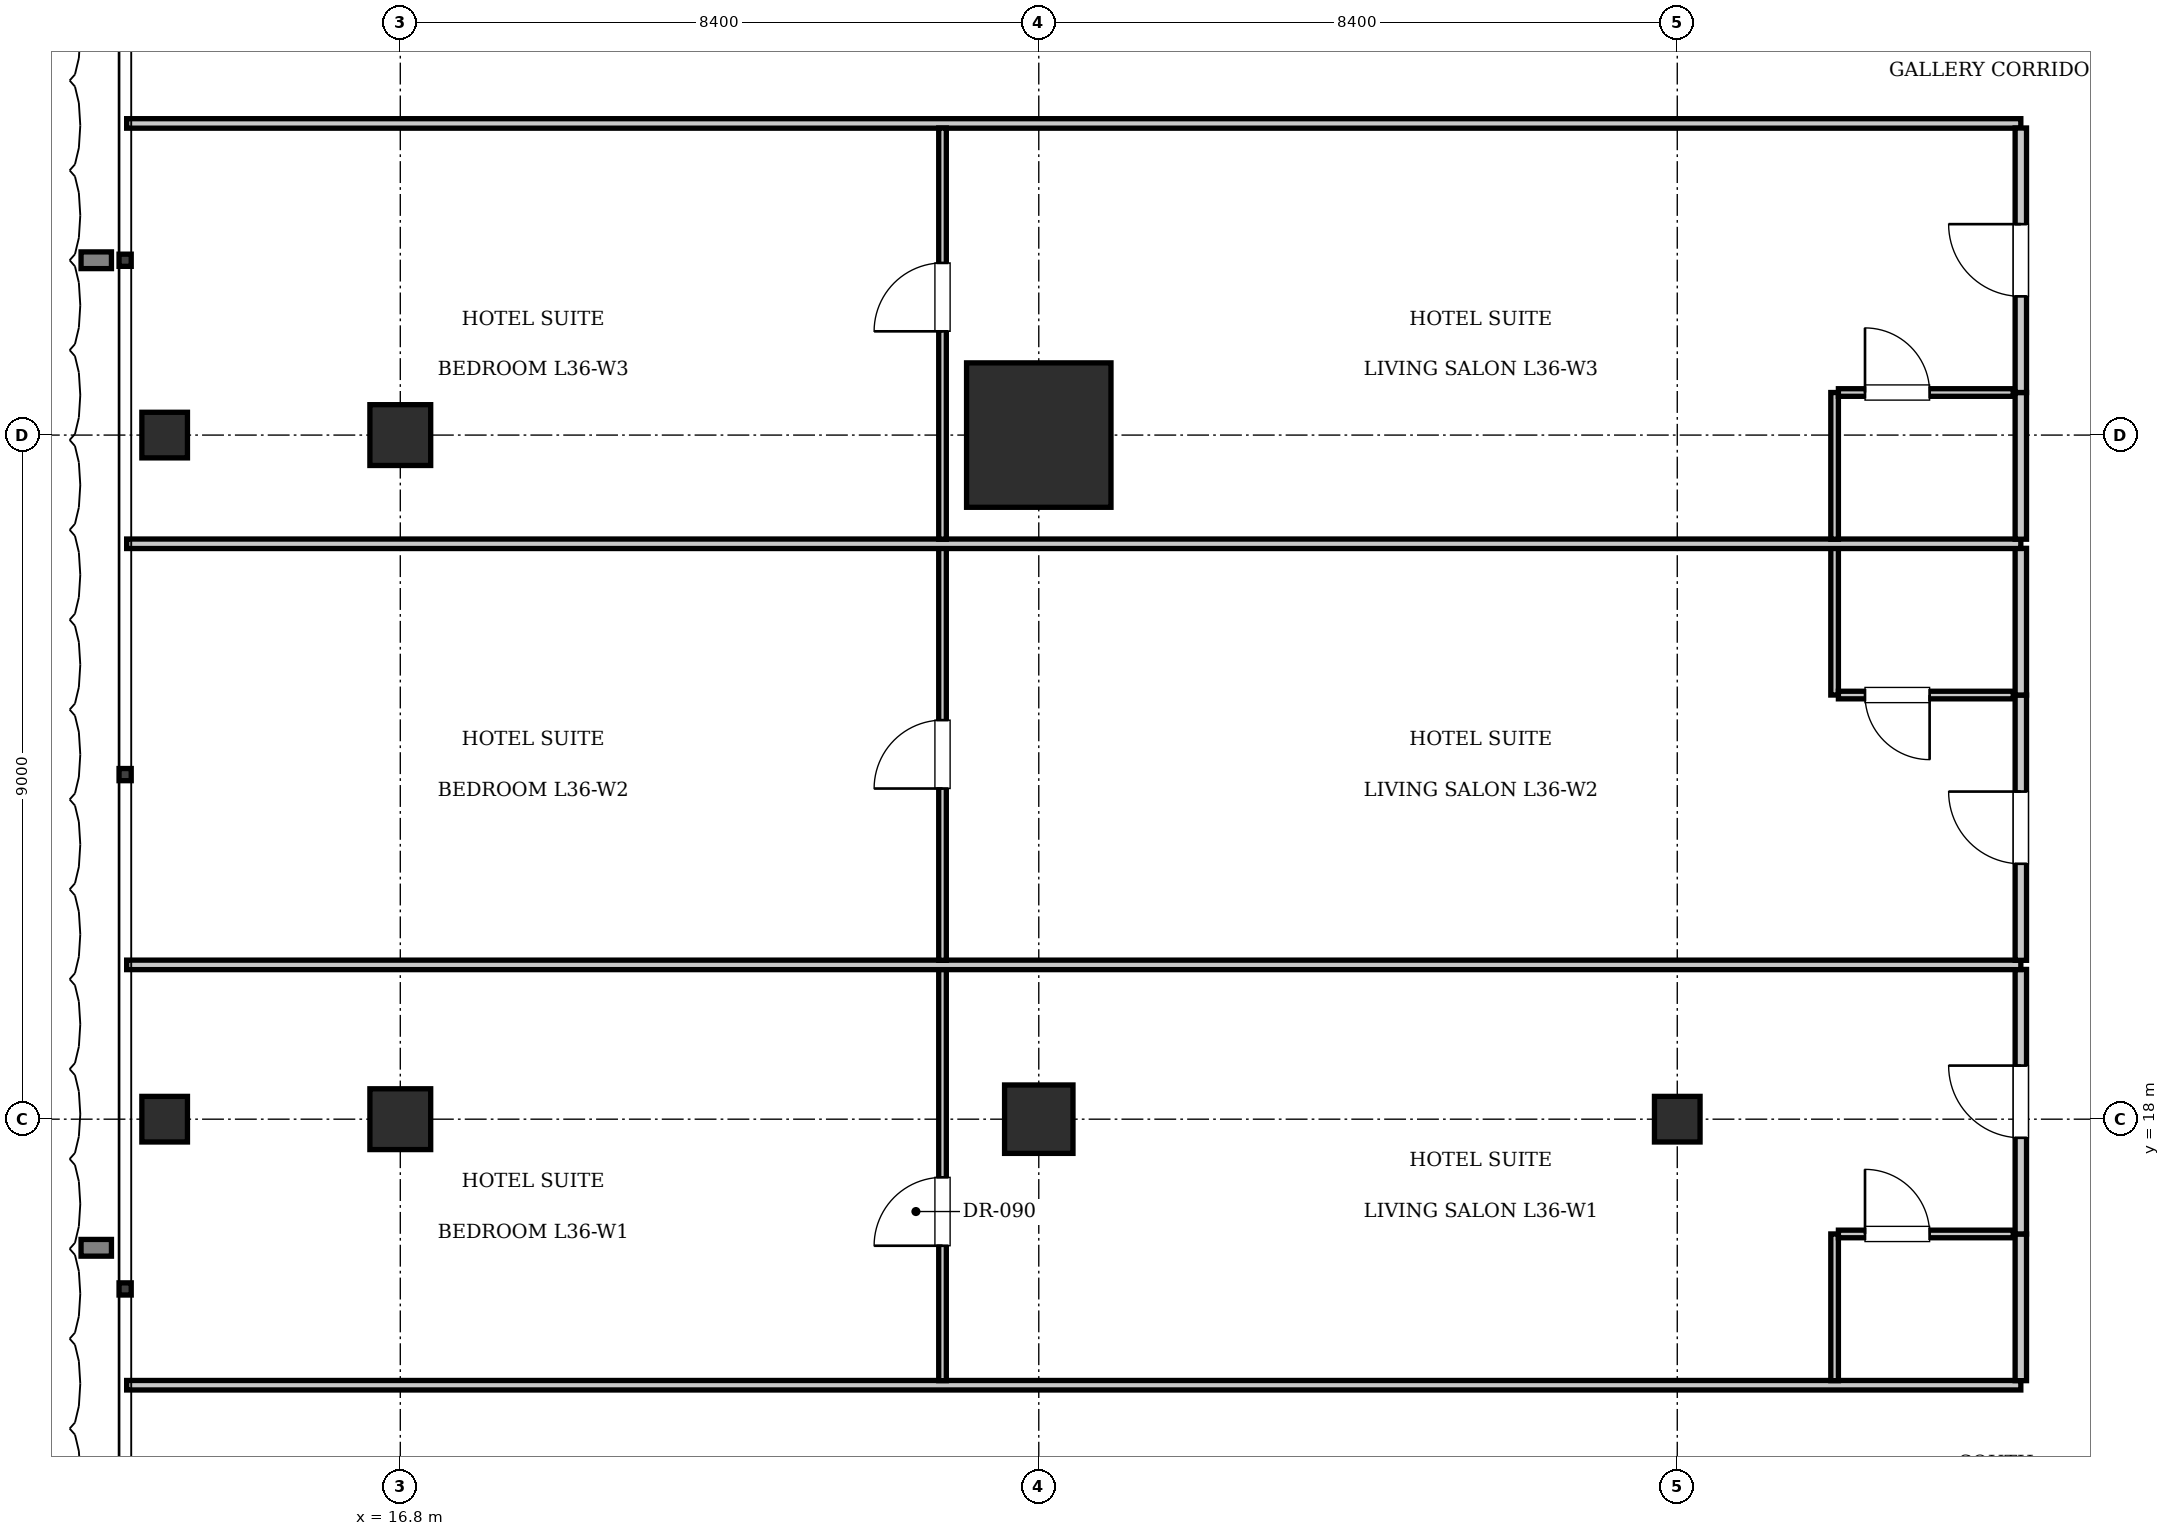
"""IFC4 building model, lengths in metres.
Left out: names, types, materials, properties, quantities, classifications, styles, units other than length and angle.
Written with IfcOpenShell. Run it as: python <this file> out.ifc"""

import sys

from ifc_helpers import new_model, si_unit, direction, frame, frame_2d, origin, origin_2d, place, context, subcontext, project, spatial, rectangle, i_section, extrude, element, fill, save


model = new_model("IFC4")
c1 = context("Model", 3, precision=1e-05, world=origin(), true_north=direction((0.0, 1.0)))
c2 = subcontext(c1, "Body", "Model", "MODEL_VIEW")
j1 = project(units=[si_unit("LENGTHUNIT", "METRE"), si_unit("PLANEANGLEUNIT", "RADIAN")], contexts=[c1])
p1 = place(None, origin())
s1 = spatial("IfcSite", under=j1, at=p1, CompositionType="ELEMENT")
p2 = place(p1, origin())
s2 = spatial("IfcBuilding", under=s1, at=p2, CompositionType="ELEMENT")
p3 = place(p2, frame((0.0, 0.0, 150.5)))
s3 = spatial("IfcBuildingStorey", under=s2, at=p3, CompositionType="ELEMENT", Elevation=150.5)
p4 = place(p3, frame((25.2, 27.0, 0.0), z_axis=(0.0, 0.0, 1.0), x_axis=(1.0, 0.0, 0.0)))
e1 = element("IfcColumn", 1, at=p4, inside=s3, PredefinedType="COLUMN", context=c2, shape_type="SweptSolid", body=[
    extrude(rectangle(XDim=1.9, YDim=1.9, at=origin_2d()), origin(), (0.0, 0.0, 1.0), 3.85),
])
p5 = place(p3, frame((25.2, 18.0, 0.0), z_axis=(0.0, 0.0, 1.0), x_axis=(1.0, 0.0, 0.0)))
e2 = element("IfcColumn", 2, at=p5, inside=s3, PredefinedType="COLUMN", context=c2, shape_type="SweptSolid", body=[
    extrude(rectangle(XDim=0.9, YDim=0.9, at=origin_2d()), origin(), (0.0, 0.0, 1.0), 3.85),
])
p6 = place(p3, frame((33.6, 18.0, 0.0), z_axis=(0.0, 0.0, 1.0), x_axis=(1.0, 0.0, 0.0)))
e3 = element("IfcColumn", 3, at=p6, inside=s3, PredefinedType="COLUMN", context=c2, shape_type="SweptSolid", body=[
    extrude(i_section(OverallWidth=0.6, OverallDepth=0.6, WebThickness=0.025, FlangeThickness=0.038, at=origin_2d()), origin(), (0.0, 0.0, 1.0), 3.85),
])
for number, where, z_axis, x_axis in (
    (4, (16.8, 18.0, 0.0), (0.0, 0.0, 1.0), (1.0, 0.0, 0.0)),
    (5, (16.8, 27.0, 0.0), (0.0, 0.0, 1.0), (1.0, 0.0, 0.0)),
):
    element("IfcColumn", number, at=place(p3, frame(where, z_axis=z_axis, x_axis=x_axis)), inside=s3, PredefinedType="COLUMN", context=c2, shape_type="SweptSolid", body=[
        extrude(rectangle(XDim=0.8, YDim=0.8, at=origin_2d()), origin(), (0.0, 0.0, 1.0), 3.85),
    ])
for number, where, z_axis, x_axis in (
    (6, (13.7, 18.0, 0.0), (0.0, 0.0, 1.0), (1.0, 0.0, 0.0)),
    (7, (13.7, 27.0, 0.0), (0.0, 0.0, 1.0), (1.0, 0.0, 0.0)),
):
    element("IfcColumn", number, at=place(p3, frame(where, z_axis=z_axis, x_axis=x_axis)), inside=s3, PredefinedType="COLUMN", context=c2, shape_type="SweptSolid", body=[
        extrude(i_section(OverallWidth=0.6, OverallDepth=0.6, WebThickness=0.025, FlangeThickness=0.038, at=origin_2d()), origin(), (0.0, 0.0, 1.0), 3.85),
    ])
for number, where, z_axis, x_axis in (
    (8, (13.2, 14.5, 0.0), (0.0, 0.0, 1.0), (1.0, 0.0, 0.0)),
    (9, (13.2, 31.1, 0.0), (0.0, 0.0, 1.0), (1.0, 0.0, 0.0)),
):
    element("IfcWall", number, at=place(p3, frame(where, z_axis=z_axis, x_axis=x_axis)), inside=s3, PredefinedType="PARTITIONING", context=c2, shape_type="SweptSolid", body=[
        extrude(rectangle(XDim=24.92, YDim=0.125, at=frame_2d((12.46, 0.0))), origin(), (0.0, 0.0, 1.0), 3.61),
    ])
p7 = place(p3, frame((38.12, 14.56, 0.0), z_axis=(0.0, 0.0, 1.0), x_axis=(0.0, 1.0, 0.0)))
e10 = element("IfcWall", 10, at=p7, inside=s3, PredefinedType="PARTITIONING", context=c2, shape_type="SweptSolid", body=[
    extrude(rectangle(XDim=1.93, YDim=0.15, at=frame_2d((0.965, 0.0))), origin(), (0.0, 0.0, 1.0), 3.61),
])
p8 = place(p3, frame((38.12, 16.49, 0.0), z_axis=(0.0, 0.0, 1.0), x_axis=(0.0, 1.0, 0.0)))
e11 = element("IfcWall", 11, at=p8, inside=s3, PredefinedType="PARTITIONING", context=c2, shape_type="SweptSolid", body=[
    extrude(rectangle(XDim=3.48, YDim=0.15, at=frame_2d((1.74, 0.0))), origin(), (0.0, 0.0, 1.0), 3.61),
])
p9 = place(p8, frame((1.265, 0.0, 0.0)))
e12 = element("IfcOpeningElement", 12, at=p9, cuts=e11, PredefinedType="OPENING", context=c2, shape_type="SweptSolid", body=[
    extrude(rectangle(XDim=0.95, YDim=2.15, at=frame_2d((0.475, 1.075))), frame((0.0, 0.085, 0.0), z_axis=(0.0, -1.0, 0.0), x_axis=(1.0, 0.0, 0.0)), (0.0, 0.0, 1.0), 0.17),
])
p10 = place(p3, frame((35.67, 14.56, 0.0), z_axis=(0.0, 0.0, 1.0), x_axis=(0.0, 1.0, 0.0)))
e13 = element("IfcWall", 13, at=p10, inside=s3, PredefinedType="PARTITIONING", context=c2, shape_type="SweptSolid", body=[
    extrude(rectangle(XDim=1.93, YDim=0.1, at=frame_2d((0.965, 0.0))), origin(), (0.0, 0.0, 1.0), 3.61),
])
p11 = place(p3, frame((35.72, 16.49, 0.0), z_axis=(0.0, 0.0, 1.0), x_axis=(1.0, 0.0, 0.0)))
e14 = element("IfcWall", 14, at=p11, inside=s3, PredefinedType="PARTITIONING", context=c2, shape_type="SweptSolid", body=[
    extrude(rectangle(XDim=2.3, YDim=0.1, at=frame_2d((1.15, 0.0))), origin(), (0.0, 0.0, 1.0), 3.61),
])
p12 = place(p11, frame((0.35, 0.0, 0.0)))
e15 = element("IfcOpeningElement", 15, at=p12, cuts=e14, PredefinedType="OPENING", context=c2, shape_type="SweptSolid", body=[
    extrude(rectangle(XDim=0.85, YDim=2.1, at=frame_2d((0.425, 1.05))), frame((0.0, 0.06, 0.0), z_axis=(0.0, -1.0, 0.0), x_axis=(1.0, 0.0, 0.0)), (0.0, 0.0, 1.0), 0.12),
])
p13 = place(p3, frame((23.934, 14.56, 0.0), z_axis=(0.0, 0.0, 1.0), x_axis=(0.0, 1.0, 0.0)))
e16 = element("IfcWall", 16, at=p13, inside=s3, PredefinedType="PARTITIONING", context=c2, shape_type="SweptSolid", body=[
    extrude(rectangle(XDim=5.41, YDim=0.1, at=frame_2d((2.705, 0.0))), origin(), (0.0, 0.0, 1.0), 3.61),
])
p14 = place(p13, frame((1.775, 0.0, 0.0)))
e17 = element("IfcOpeningElement", 17, at=p14, cuts=e16, PredefinedType="OPENING", context=c2, shape_type="SweptSolid", body=[
    extrude(rectangle(XDim=0.9, YDim=2.1, at=frame_2d((0.45, 1.05))), frame((0.0, 0.06, 0.0), z_axis=(0.0, -1.0, 0.0), x_axis=(1.0, 0.0, 0.0)), (0.0, 0.0, 1.0), 0.12),
])
p15 = place(p3, frame((13.2, 20.03, 0.0), z_axis=(0.0, 0.0, 1.0), x_axis=(1.0, 0.0, 0.0)))
e18 = element("IfcWall", 18, at=p15, inside=s3, PredefinedType="PARTITIONING", context=c2, shape_type="SweptSolid", body=[
    extrude(rectangle(XDim=24.92, YDim=0.125, at=frame_2d((12.46, 0.0))), origin(), (0.0, 0.0, 1.0), 3.61),
])
p16 = place(p3, frame((38.12, 20.09, 0.0), z_axis=(0.0, 0.0, 1.0), x_axis=(0.0, 1.0, 0.0)))
e19 = element("IfcWall", 19, at=p16, inside=s3, PredefinedType="PARTITIONING", context=c2, shape_type="SweptSolid", body=[
    extrude(rectangle(XDim=3.49, YDim=0.15, at=frame_2d((1.745, 0.0))), origin(), (0.0, 0.0, 1.0), 3.61),
])
p17 = place(p16, frame((1.27, 0.0, 0.0)))
e20 = element("IfcOpeningElement", 20, at=p17, cuts=e19, PredefinedType="OPENING", context=c2, shape_type="SweptSolid", body=[
    extrude(rectangle(XDim=0.95, YDim=2.15, at=frame_2d((0.475, 1.075))), frame((0.0, 0.085, 0.0), z_axis=(0.0, -1.0, 0.0), x_axis=(1.0, 0.0, 0.0)), (0.0, 0.0, 1.0), 0.17),
])
p18 = place(p3, frame((38.12, 23.58, 0.0), z_axis=(0.0, 0.0, 1.0), x_axis=(0.0, 1.0, 0.0)))
e21 = element("IfcWall", 21, at=p18, inside=s3, PredefinedType="PARTITIONING", context=c2, shape_type="SweptSolid", body=[
    extrude(rectangle(XDim=1.93, YDim=0.15, at=frame_2d((0.965, 0.0))), origin(), (0.0, 0.0, 1.0), 3.61),
])
p19 = place(p3, frame((35.67, 23.58, 0.0), z_axis=(0.0, 0.0, 1.0), x_axis=(0.0, 1.0, 0.0)))
e22 = element("IfcWall", 22, at=p19, inside=s3, PredefinedType="PARTITIONING", context=c2, shape_type="SweptSolid", body=[
    extrude(rectangle(XDim=1.93, YDim=0.1, at=frame_2d((0.965, 0.0))), origin(), (0.0, 0.0, 1.0), 3.61),
])
p20 = place(p3, frame((35.72, 23.58, 0.0), z_axis=(0.0, 0.0, 1.0), x_axis=(1.0, 0.0, 0.0)))
e23 = element("IfcWall", 23, at=p20, inside=s3, PredefinedType="PARTITIONING", context=c2, shape_type="SweptSolid", body=[
    extrude(rectangle(XDim=2.3, YDim=0.1, at=frame_2d((1.15, 0.0))), origin(), (0.0, 0.0, 1.0), 3.61),
])
p21 = place(p20, frame((0.35, 0.0, 0.0)))
e24 = element("IfcOpeningElement", 24, at=p21, cuts=e23, PredefinedType="OPENING", context=c2, shape_type="SweptSolid", body=[
    extrude(rectangle(XDim=0.85, YDim=2.1, at=frame_2d((0.425, 1.05))), frame((0.0, 0.06, 0.0), z_axis=(0.0, -1.0, 0.0), x_axis=(1.0, 0.0, 0.0)), (0.0, 0.0, 1.0), 0.12),
])
p22 = place(p3, frame((23.934, 20.09, 0.0), z_axis=(0.0, 0.0, 1.0), x_axis=(0.0, 1.0, 0.0)))
e25 = element("IfcWall", 25, at=p22, inside=s3, PredefinedType="PARTITIONING", context=c2, shape_type="SweptSolid", body=[
    extrude(rectangle(XDim=5.42, YDim=0.1, at=frame_2d((2.71, 0.0))), origin(), (0.0, 0.0, 1.0), 3.61),
])
p23 = place(p22, frame((2.26, 0.0, 0.0)))
e26 = element("IfcOpeningElement", 26, at=p23, cuts=e25, PredefinedType="OPENING", context=c2, shape_type="SweptSolid", body=[
    extrude(rectangle(XDim=0.9, YDim=2.1, at=frame_2d((0.45, 1.05))), frame((0.0, 0.06, 0.0), z_axis=(0.0, -1.0, 0.0), x_axis=(1.0, 0.0, 0.0)), (0.0, 0.0, 1.0), 0.12),
])
p24 = place(p3, frame((13.2, 25.57, 0.0), z_axis=(0.0, 0.0, 1.0), x_axis=(1.0, 0.0, 0.0)))
e27 = element("IfcWall", 27, at=p24, inside=s3, PredefinedType="PARTITIONING", context=c2, shape_type="SweptSolid", body=[
    extrude(rectangle(XDim=24.92, YDim=0.125, at=frame_2d((12.46, 0.0))), origin(), (0.0, 0.0, 1.0), 3.61),
])
p25 = place(p3, frame((38.12, 25.63, 0.0), z_axis=(0.0, 0.0, 1.0), x_axis=(0.0, 1.0, 0.0)))
e28 = element("IfcWall", 28, at=p25, inside=s3, PredefinedType="PARTITIONING", context=c2, shape_type="SweptSolid", body=[
    extrude(rectangle(XDim=1.93, YDim=0.15, at=frame_2d((0.965, 0.0))), origin(), (0.0, 0.0, 1.0), 3.61),
])
p26 = place(p3, frame((38.12, 27.56, 0.0), z_axis=(0.0, 0.0, 1.0), x_axis=(0.0, 1.0, 0.0)))
e29 = element("IfcWall", 29, at=p26, inside=s3, PredefinedType="PARTITIONING", context=c2, shape_type="SweptSolid", body=[
    extrude(rectangle(XDim=3.48, YDim=0.15, at=frame_2d((1.74, 0.0))), origin(), (0.0, 0.0, 1.0), 3.61),
])
p27 = place(p26, frame((1.265, 0.0, 0.0)))
e30 = element("IfcOpeningElement", 30, at=p27, cuts=e29, PredefinedType="OPENING", context=c2, shape_type="SweptSolid", body=[
    extrude(rectangle(XDim=0.95, YDim=2.15, at=frame_2d((0.475, 1.075))), frame((0.0, 0.085, 0.0), z_axis=(0.0, -1.0, 0.0), x_axis=(1.0, 0.0, 0.0)), (0.0, 0.0, 1.0), 0.17),
])
p28 = place(p3, frame((35.67, 25.63, 0.0), z_axis=(0.0, 0.0, 1.0), x_axis=(0.0, 1.0, 0.0)))
e31 = element("IfcWall", 31, at=p28, inside=s3, PredefinedType="PARTITIONING", context=c2, shape_type="SweptSolid", body=[
    extrude(rectangle(XDim=1.93, YDim=0.1, at=frame_2d((0.965, 0.0))), origin(), (0.0, 0.0, 1.0), 3.61),
])
p29 = place(p3, frame((35.72, 27.56, 0.0), z_axis=(0.0, 0.0, 1.0), x_axis=(1.0, 0.0, 0.0)))
e32 = element("IfcWall", 32, at=p29, inside=s3, PredefinedType="PARTITIONING", context=c2, shape_type="SweptSolid", body=[
    extrude(rectangle(XDim=2.3, YDim=0.1, at=frame_2d((1.15, 0.0))), origin(), (0.0, 0.0, 1.0), 3.61),
])
p30 = place(p29, frame((0.35, 0.0, 0.0)))
e33 = element("IfcOpeningElement", 33, at=p30, cuts=e32, PredefinedType="OPENING", context=c2, shape_type="SweptSolid", body=[
    extrude(rectangle(XDim=0.85, YDim=2.1, at=frame_2d((0.425, 1.05))), frame((0.0, 0.06, 0.0), z_axis=(0.0, -1.0, 0.0), x_axis=(1.0, 0.0, 0.0)), (0.0, 0.0, 1.0), 0.12),
])
p31 = place(p3, frame((23.934, 25.63, 0.0), z_axis=(0.0, 0.0, 1.0), x_axis=(0.0, 1.0, 0.0)))
e34 = element("IfcWall", 34, at=p31, inside=s3, PredefinedType="PARTITIONING", context=c2, shape_type="SweptSolid", body=[
    extrude(rectangle(XDim=5.41, YDim=0.1, at=frame_2d((2.705, 0.0))), origin(), (0.0, 0.0, 1.0), 3.61),
])
p32 = place(p31, frame((2.735, 0.0, 0.0)))
e35 = element("IfcOpeningElement", 35, at=p32, cuts=e34, PredefinedType="OPENING", context=c2, shape_type="SweptSolid", body=[
    extrude(rectangle(XDim=0.9, YDim=2.1, at=frame_2d((0.45, 1.05))), frame((0.0, 0.06, 0.0), z_axis=(0.0, -1.0, 0.0), x_axis=(1.0, 0.0, 0.0)), (0.0, 0.0, 1.0), 0.12),
])
p33 = place(p12, origin())
e36 = element("IfcDoor", 36, at=p33, inside=s3, OperationType="SINGLE_SWING_LEFT", PredefinedType="DOOR", context=c2, shape_type="SweptSolid", body=[
    extrude(rectangle(XDim=0.85, YDim=2.1, at=frame_2d((0.425, 1.05))), frame((0.0, 0.025, 0.0), z_axis=(0.0, -1.0, 0.0), x_axis=(1.0, 0.0, 0.0)), (0.0, 0.0, 1.0), 0.05),
])
fill(e15, e36)
p34 = place(p9, origin())
e37 = element("IfcDoor", 37, at=p34, inside=s3, OperationType="SINGLE_SWING_RIGHT", PredefinedType="DOOR", context=c2, shape_type="SweptSolid", body=[
    extrude(rectangle(XDim=0.95, YDim=2.15, at=frame_2d((0.475, 1.075))), frame((0.0, 0.025, 0.0), z_axis=(0.0, -1.0, 0.0), x_axis=(1.0, 0.0, 0.0)), (0.0, 0.0, 1.0), 0.05),
])
fill(e12, e37)
p35 = place(p14, origin())
e38 = element("IfcDoor", 38, at=p35, inside=s3, OperationType="SINGLE_SWING_LEFT", PredefinedType="DOOR", context=c2, shape_type="SweptSolid", body=[
    extrude(rectangle(XDim=0.9, YDim=2.1, at=frame_2d((0.45, 1.05))), frame((0.0, 0.025, 0.0), z_axis=(0.0, -1.0, 0.0), x_axis=(1.0, 0.0, 0.0)), (0.0, 0.0, 1.0), 0.05),
])
fill(e17, e38)
p36 = place(p21, frame((0.85, 0.0, 0.0), z_axis=(0.0, 0.0, 1.0), x_axis=(-1.0, 0.0, 0.0)))
e39 = element("IfcDoor", 39, at=p36, inside=s3, OperationType="SINGLE_SWING_LEFT", PredefinedType="DOOR", context=c2, shape_type="SweptSolid", body=[
    extrude(rectangle(XDim=0.85, YDim=2.1, at=frame_2d((0.425, 1.05))), frame((0.0, 0.025, 0.0), z_axis=(0.0, -1.0, 0.0), x_axis=(1.0, 0.0, 0.0)), (0.0, 0.0, 1.0), 0.05),
])
fill(e24, e39)
p37 = place(p17, origin())
e40 = element("IfcDoor", 40, at=p37, inside=s3, OperationType="SINGLE_SWING_RIGHT", PredefinedType="DOOR", context=c2, shape_type="SweptSolid", body=[
    extrude(rectangle(XDim=0.95, YDim=2.15, at=frame_2d((0.475, 1.075))), frame((0.0, 0.025, 0.0), z_axis=(0.0, -1.0, 0.0), x_axis=(1.0, 0.0, 0.0)), (0.0, 0.0, 1.0), 0.05),
])
fill(e20, e40)
p38 = place(p23, origin())
e41 = element("IfcDoor", 41, at=p38, inside=s3, OperationType="SINGLE_SWING_LEFT", PredefinedType="DOOR", context=c2, shape_type="SweptSolid", body=[
    extrude(rectangle(XDim=0.9, YDim=2.1, at=frame_2d((0.45, 1.05))), frame((0.0, 0.025, 0.0), z_axis=(0.0, -1.0, 0.0), x_axis=(1.0, 0.0, 0.0)), (0.0, 0.0, 1.0), 0.05),
])
fill(e26, e41)
p39 = place(p30, origin())
e42 = element("IfcDoor", 42, at=p39, inside=s3, OperationType="SINGLE_SWING_LEFT", PredefinedType="DOOR", context=c2, shape_type="SweptSolid", body=[
    extrude(rectangle(XDim=0.85, YDim=2.1, at=frame_2d((0.425, 1.05))), frame((0.0, 0.025, 0.0), z_axis=(0.0, -1.0, 0.0), x_axis=(1.0, 0.0, 0.0)), (0.0, 0.0, 1.0), 0.05),
])
fill(e33, e42)
p40 = place(p27, origin())
e43 = element("IfcDoor", 43, at=p40, inside=s3, OperationType="SINGLE_SWING_RIGHT", PredefinedType="DOOR", context=c2, shape_type="SweptSolid", body=[
    extrude(rectangle(XDim=0.95, YDim=2.15, at=frame_2d((0.475, 1.075))), frame((0.0, 0.025, 0.0), z_axis=(0.0, -1.0, 0.0), x_axis=(1.0, 0.0, 0.0)), (0.0, 0.0, 1.0), 0.05),
])
fill(e30, e43)
p41 = place(p32, origin())
e44 = element("IfcDoor", 44, at=p41, inside=s3, OperationType="SINGLE_SWING_LEFT", PredefinedType="DOOR", context=c2, shape_type="SweptSolid", body=[
    extrude(rectangle(XDim=0.9, YDim=2.1, at=frame_2d((0.45, 1.05))), frame((0.0, 0.025, 0.0), z_axis=(0.0, -1.0, 0.0), x_axis=(1.0, 0.0, 0.0)), (0.0, 0.0, 1.0), 0.05),
])
fill(e35, e44)
save(model, sys.argv[1])
